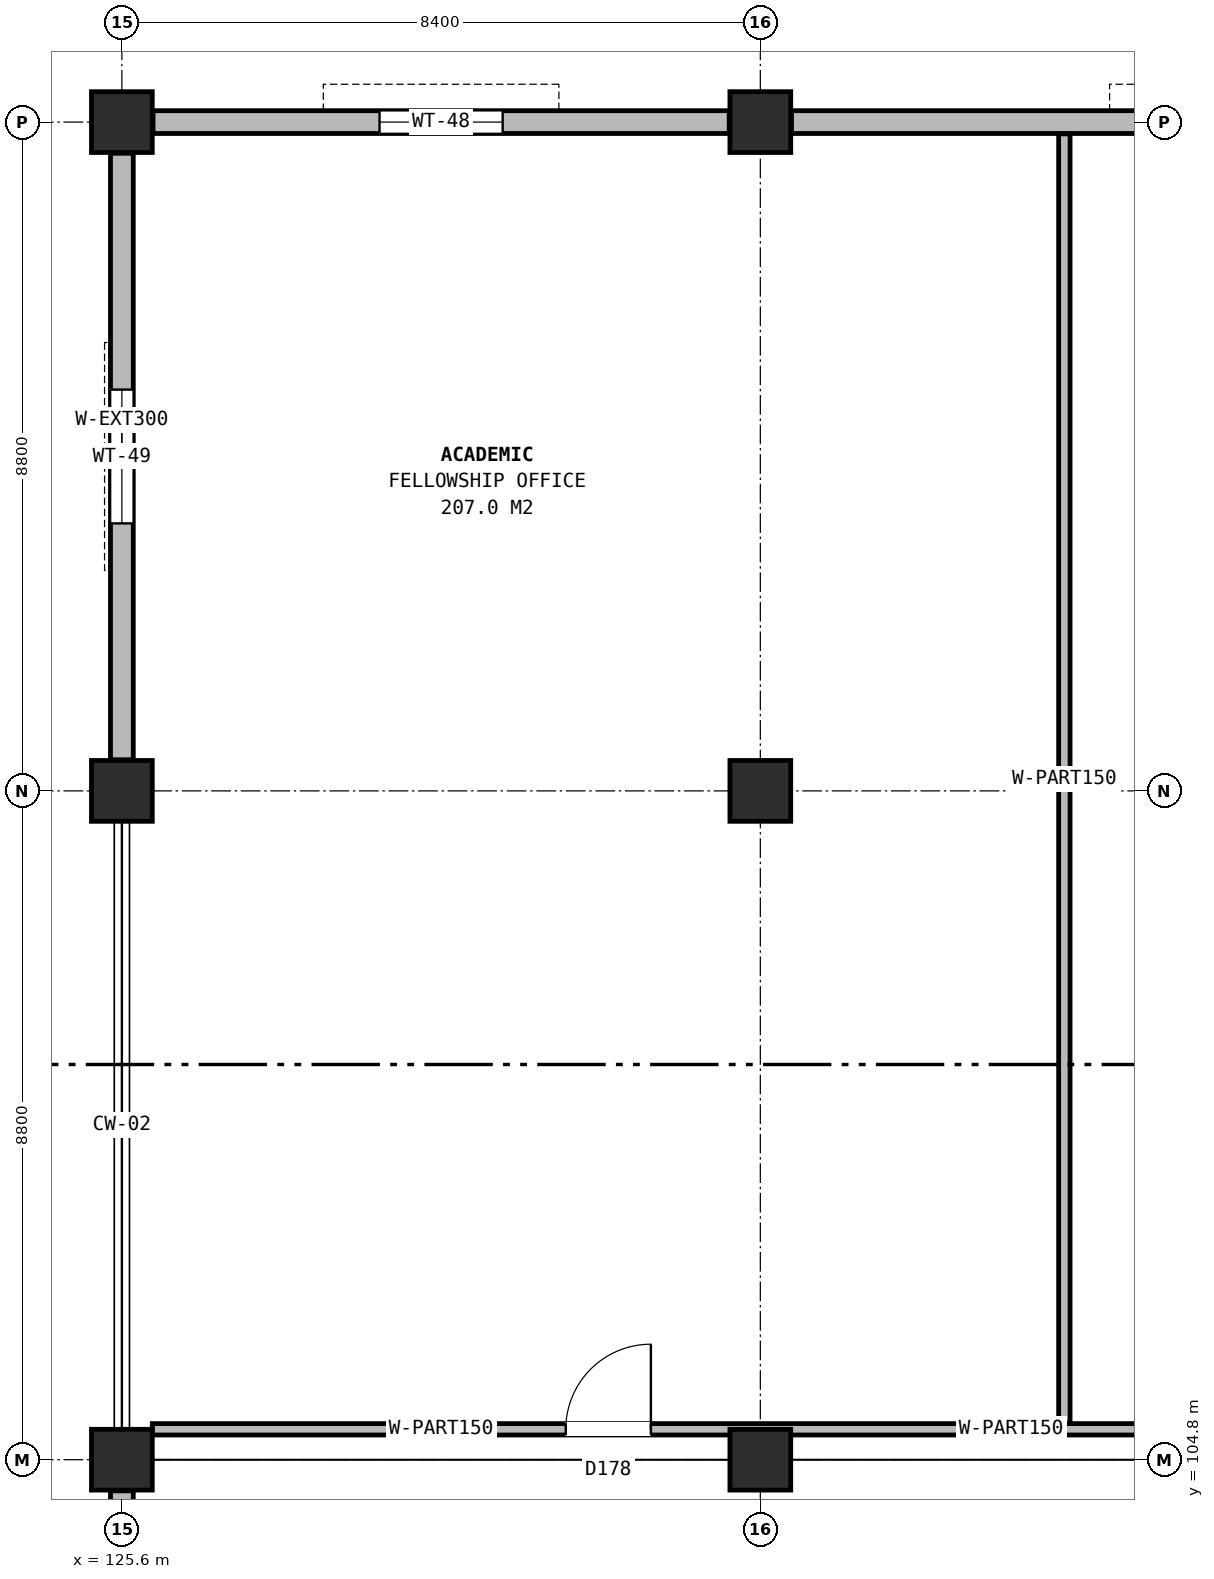
"""IFC4 building model, lengths in metres.
Left out: names, types, materials, properties, quantities, classifications, styles, units other than length and angle.
Written with IfcOpenShell. Run it as: python <this file> out.ifc"""

import sys

from ifc_helpers import new_model, si_unit, direction, frame, frame_2d, origin, origin_2d, place, context, subcontext, project, spatial, rectangle, extrude, element, fill, save


model = new_model("IFC4")
c1 = context("Model", 3, precision=1e-05, world=origin(), true_north=direction((0.0, 1.0)))
c2 = subcontext(c1, "Body", "Model", "MODEL_VIEW")
j1 = project(units=[si_unit("LENGTHUNIT", "METRE"), si_unit("PLANEANGLEUNIT", "RADIAN")], contexts=[c1])
p1 = place(None, origin())
s1 = spatial("IfcSite", under=j1, at=p1, CompositionType="ELEMENT")
p2 = place(p1, origin())
s2 = spatial("IfcBuilding", under=s1, at=p2, CompositionType="ELEMENT")
p3 = place(p2, frame((0.0, 0.0, 9.0)))
s3 = spatial("IfcBuildingStorey", under=s2, at=p3, CompositionType="ELEMENT", Elevation=9.0)
for number, where, z_axis, x_axis in (
    (1, (125.6, 104.8, 0.0), (0.0, 0.0, 1.0), (1.0, 0.0, 0.0)),
    (2, (125.6, 113.6, 0.0), (0.0, 0.0, 1.0), (1.0, 0.0, 0.0)),
    (3, (125.6, 122.4, 0.0), (0.0, 0.0, 1.0), (1.0, 0.0, 0.0)),
    (4, (134.0, 104.8, 0.0), (0.0, 0.0, 1.0), (1.0, 0.0, 0.0)),
    (5, (134.0, 113.6, 0.0), (0.0, 0.0, 1.0), (1.0, 0.0, 0.0)),
    (6, (134.0, 122.4, 0.0), (0.0, 0.0, 1.0), (1.0, 0.0, 0.0)),
):
    element("IfcColumn", number, at=place(p3, frame(where, z_axis=z_axis, x_axis=x_axis)), inside=s3, PredefinedType="COLUMN", context=c2, shape_type="SweptSolid", body=[
        extrude(rectangle(XDim=0.8, YDim=0.8, at=origin_2d()), origin(), (0.0, 0.0, 1.0), 4.2),
    ])
p4 = place(p3, frame((141.99, 122.4, 0.0), z_axis=(0.0, 0.0, 1.0), x_axis=(-1.0, 0.0, 0.0)))
e7 = element("IfcWall", 7, at=p4, inside=s3, PredefinedType="SOLIDWALL", context=c2, shape_type="SweptSolid", body=[
    extrude(rectangle(XDim=7.58, YDim=0.3, at=frame_2d((3.79, 0.0))), origin(), (0.0, 0.0, 1.0), 3.45),
])
p5 = place(p4, frame((1.255, 0.0, 0.9)))
e8 = element("IfcOpeningElement", 8, at=p5, cuts=e7, PredefinedType="OPENING", context=c2, shape_type="SweptSolid", body=[
    extrude(rectangle(XDim=1.48, YDim=1.84, at=frame_2d((0.74, 0.92))), frame((0.0, 0.16, 0.0), z_axis=(0.0, -1.0, 0.0), x_axis=(1.0, 0.0, 0.0)), (0.0, 0.0, 1.0), 0.32),
])
p6 = place(p3, frame((133.59, 122.4, 0.0), z_axis=(0.0, 0.0, 1.0), x_axis=(-1.0, 0.0, 0.0)))
e9 = element("IfcWall", 9, at=p6, inside=s3, PredefinedType="SOLIDWALL", context=c2, shape_type="SweptSolid", body=[
    extrude(rectangle(XDim=7.58, YDim=0.3, at=frame_2d((3.79, 0.0))), origin(), (0.0, 0.0, 1.0), 3.45),
])
p7 = place(p6, frame((2.98, 0.0, 0.9)))
e10 = element("IfcOpeningElement", 10, at=p7, cuts=e9, PredefinedType="OPENING", context=c2, shape_type="SweptSolid", body=[
    extrude(rectangle(XDim=1.62, YDim=1.88, at=frame_2d((0.81, 0.94))), frame((0.0, 0.16, 0.0), z_axis=(0.0, -1.0, 0.0), x_axis=(1.0, 0.0, 0.0)), (0.0, 0.0, 1.0), 0.32),
])
p8 = place(p3, frame((125.6, 121.99, 0.0), z_axis=(0.0, 0.0, 1.0), x_axis=(0.0, -1.0, 0.0)))
e11 = element("IfcWall", 11, at=p8, inside=s3, PredefinedType="SOLIDWALL", context=c2, shape_type="SweptSolid", body=[
    extrude(rectangle(XDim=7.98, YDim=0.3, at=frame_2d((3.99, 0.0))), origin(), (0.0, 0.0, 1.0), 3.45),
])
p9 = place(p8, frame((3.11, 0.0, 0.9)))
e12 = element("IfcOpeningElement", 12, at=p9, cuts=e11, PredefinedType="OPENING", context=c2, shape_type="SweptSolid", body=[
    extrude(rectangle(XDim=1.76, YDim=1.94, at=frame_2d((0.88, 0.97))), frame((0.0, 0.16, 0.0), z_axis=(0.0, -1.0, 0.0), x_axis=(1.0, 0.0, 0.0)), (0.0, 0.0, 1.0), 0.32),
])
p10 = place(p3, frame((125.6, 104.39, 0.0), z_axis=(0.0, 0.0, 1.0), x_axis=(0.0, -1.0, 0.0)))
e13 = element("IfcWall", 13, at=p10, inside=s3, PredefinedType="SOLIDWALL", context=c2, shape_type="SweptSolid", body=[
    extrude(rectangle(XDim=7.98, YDim=0.3, at=frame_2d((3.99, 0.0))), origin(), (0.0, 0.0, 1.0), 3.45),
])
p11 = place(p10, frame((3.03, 0.0, 0.9)))
e14 = element("IfcOpeningElement", 14, at=p11, cuts=e13, PredefinedType="OPENING", context=c2, shape_type="SweptSolid", body=[
    extrude(rectangle(XDim=1.92, YDim=1.98, at=frame_2d((0.96, 0.99))), frame((0.0, 0.16, 0.0), z_axis=(0.0, -1.0, 0.0), x_axis=(1.0, 0.0, 0.0)), (0.0, 0.0, 1.0), 0.32),
])
p12 = place(p3, frame((126.0, 105.2, 0.0), z_axis=(0.0, 0.0, 1.0), x_axis=(1.0, 0.0, 0.0)))
e15 = element("IfcWall", 15, at=p12, inside=s3, PredefinedType="PARTITIONING", context=c2, shape_type="SweptSolid", body=[
    extrude(rectangle(XDim=12.0, YDim=0.15, at=frame_2d((6.0, 0.0))), origin(), (0.0, 0.0, 1.0), 3.245),
])
p13 = place(p12, frame((5.44, 0.0, 0.0)))
e16 = element("IfcOpeningElement", 16, at=p13, cuts=e15, PredefinedType="OPENING", context=c2, shape_type="SweptSolid", body=[
    extrude(rectangle(XDim=1.12, YDim=2.22, at=frame_2d((0.56, 1.11))), frame((0.0, 0.085, 0.0), z_axis=(0.0, -1.0, 0.0), x_axis=(1.0, 0.0, 0.0)), (0.0, 0.0, 1.0), 0.17),
])
p14 = place(p3, frame((138.0, 105.2, 0.0), z_axis=(0.0, 0.0, 1.0), x_axis=(1.0, 0.0, 0.0)))
e17 = element("IfcWall", 17, at=p14, inside=s3, PredefinedType="PARTITIONING", context=c2, shape_type="SweptSolid", body=[
    extrude(rectangle(XDim=10.6, YDim=0.15, at=frame_2d((5.3, 0.0))), origin(), (0.0, 0.0, 1.0), 3.245),
])
p15 = place(p14, frame((5.06, 0.0, 0.0)))
e18 = element("IfcOpeningElement", 18, at=p15, cuts=e17, PredefinedType="OPENING", context=c2, shape_type="SweptSolid", body=[
    extrude(rectangle(XDim=1.18, YDim=2.24, at=frame_2d((0.59, 1.12))), frame((0.0, 0.085, 0.0), z_axis=(0.0, -1.0, 0.0), x_axis=(1.0, 0.0, 0.0)), (0.0, 0.0, 1.0), 0.17),
])
p16 = place(p3, frame((138.0, 105.28, 0.0), z_axis=(0.0, 0.0, 1.0), x_axis=(0.0, 1.0, 0.0)))
e19 = element("IfcWall", 19, at=p16, inside=s3, PredefinedType="PARTITIONING", context=c2, shape_type="SweptSolid", body=[
    extrude(rectangle(XDim=16.965, YDim=0.15, at=frame_2d((8.482, 0.0))), origin(), (0.0, 0.0, 1.0), 3.865),
])
p17 = place(p7, origin())
e20 = element("IfcWindow", 20, at=p17, inside=s3, PartitioningType="SINGLE_PANEL", PredefinedType="WINDOW", context=c2, shape_type="SweptSolid", body=[
    extrude(rectangle(XDim=1.62, YDim=1.88, at=frame_2d((0.81, 0.94))), frame((0.0, 0.03, 0.0), z_axis=(0.0, -1.0, 0.0), x_axis=(1.0, 0.0, 0.0)), (0.0, 0.0, 1.0), 0.06),
])
fill(e10, e20)
p18 = place(p9, origin())
e21 = element("IfcWindow", 21, at=p18, inside=s3, PartitioningType="SINGLE_PANEL", PredefinedType="WINDOW", context=c2, shape_type="SweptSolid", body=[
    extrude(rectangle(XDim=1.76, YDim=1.94, at=frame_2d((0.88, 0.97))), frame((0.0, 0.03, 0.0), z_axis=(0.0, -1.0, 0.0), x_axis=(1.0, 0.0, 0.0)), (0.0, 0.0, 1.0), 0.06),
])
fill(e12, e21)
p19 = place(p13, origin())
e22 = element("IfcDoor", 22, at=p19, inside=s3, OperationType="SINGLE_SWING_RIGHT", PredefinedType="DOOR", context=c2, shape_type="SweptSolid", body=[
    extrude(rectangle(XDim=1.12, YDim=2.22, at=frame_2d((0.56, 1.11))), frame((0.0, 0.025, 0.0), z_axis=(0.0, -1.0, 0.0), x_axis=(1.0, 0.0, 0.0)), (0.0, 0.0, 1.0), 0.05),
])
fill(e16, e22)
save(model, sys.argv[1])
